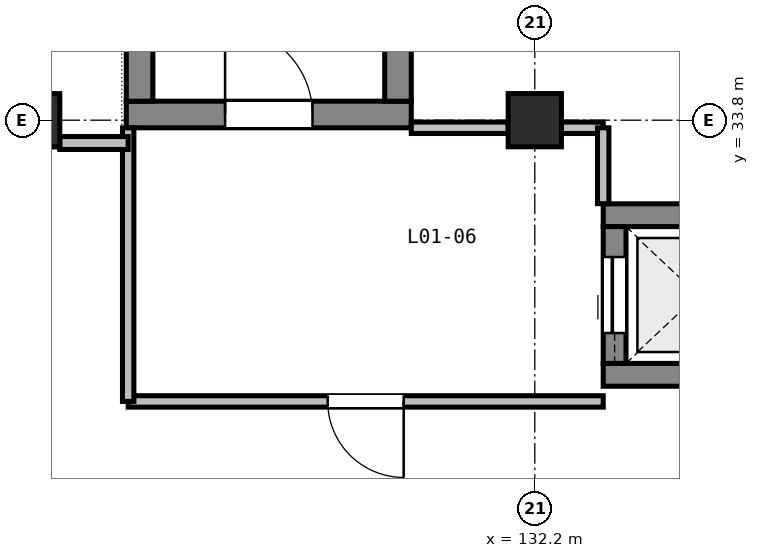
"""IFC4 building model, lengths in metres.
Left out: names, types, materials, properties, quantities, classifications, styles, units other than length and angle.
Written with IfcOpenShell. Run it as: python <this file> out.ifc"""

import sys

from ifc_helpers import new_model, si_unit, direction, frame, frame_2d, origin, origin_2d, place, context, subcontext, project, spatial, rectangle, extrude, element, fill, save


model = new_model("IFC4")
c1 = context("Model", 3, precision=1e-05, world=origin(), true_north=direction((0.0, 1.0)))
c2 = subcontext(c1, "Body", "Model", "MODEL_VIEW")
j1 = project(units=[si_unit("LENGTHUNIT", "METRE"), si_unit("PLANEANGLEUNIT", "RADIAN")], contexts=[c1])
p1 = place(None, origin())
s1 = spatial("IfcSite", under=j1, at=p1, CompositionType="ELEMENT")
p2 = place(p1, origin())
s2 = spatial("IfcBuilding", under=s1, at=p2, CompositionType="ELEMENT")
p3 = place(p2, frame((0.0, 0.0, 5.4)))
s3 = spatial("IfcBuildingStorey", under=s2, at=p3, CompositionType="ELEMENT", Elevation=5.4)
for number, where, z_axis, x_axis in (
    (1, (125.6, 33.8, 0.0), (0.0, 0.0, 1.0), (1.0, 0.0, 0.0)),
    (2, (132.2, 33.8, 0.0), (0.0, 0.0, 1.0), (1.0, 0.0, 0.0)),
):
    element("IfcColumn", number, at=place(p3, frame(where, z_axis=z_axis, x_axis=x_axis)), inside=s3, PredefinedType="COLUMN", context=c2, shape_type="SweptSolid", body=[
        extrude(rectangle(XDim=0.7, YDim=0.7, at=origin_2d()), origin(), (0.0, 0.0, 1.0), 4.8),
    ])
p4 = place(p3, frame((126.825, 33.875, 0.0), z_axis=(0.0, 0.0, 1.0), x_axis=(1.0, 0.0, 0.0)))
e3 = element("IfcWall", 3, at=p4, inside=s3, PredefinedType="SHEAR", context=c2, shape_type="SweptSolid", body=[
    extrude(rectangle(XDim=3.75, YDim=0.35, at=frame_2d((1.875, 0.0))), origin(), (0.0, 0.0, 1.0), 4.8),
])
p5 = place(p4, frame((1.3, 0.0, 0.0)))
e4 = element("IfcOpeningElement", 4, at=p5, cuts=e3, PredefinedType="OPENING", context=c2, shape_type="SweptSolid", body=[
    extrude(rectangle(XDim=1.15, YDim=2.15, at=frame_2d((0.575, 1.075))), frame((0.0, 0.185, 0.0), z_axis=(0.0, -1.0, 0.0), x_axis=(1.0, 0.0, 0.0)), (0.0, 0.0, 1.0), 0.37),
])
for number, where, z_axis, x_axis in (
    (5, (127.0, 34.05, 0.0), (0.0, 0.0, 1.0), (0.0, 1.0, 0.0)),
    (6, (130.4, 34.05, 0.0), (0.0, 0.0, 1.0), (0.0, 1.0, 0.0)),
):
    element("IfcWall", number, at=place(p3, frame(where, z_axis=z_axis, x_axis=x_axis)), inside=s3, PredefinedType="SHEAR", context=c2, shape_type="SweptSolid", body=[
        extrude(rectangle(XDim=7.275, YDim=0.35, at=frame_2d((3.637, 0.0))), origin(), (0.0, 0.0, 1.0), 4.8),
    ])
for number, where, z_axis, x_axis in (
    (7, (133.1, 30.45, 0.0), (0.0, 0.0, 1.0), (1.0, 0.0, 0.0)),
    (8, (133.1, 32.55, 0.0), (0.0, 0.0, 1.0), (1.0, 0.0, 0.0)),
):
    element("IfcWall", number, at=place(p3, frame(where, z_axis=z_axis, x_axis=x_axis)), inside=s3, PredefinedType="SHEAR", context=c2, shape_type="SweptSolid", body=[
        extrude(rectangle(XDim=2.5, YDim=0.3, at=frame_2d((1.25, 0.0))), origin(), (0.0, 0.0, 1.0), 4.8),
    ])
p6 = place(p3, frame((133.25, 30.6, 0.0), z_axis=(0.0, 0.0, 1.0), x_axis=(0.0, 1.0, 0.0)))
e9 = element("IfcWall", 9, at=p6, inside=s3, PredefinedType="SHEAR", context=c2, shape_type="SweptSolid", body=[
    extrude(rectangle(XDim=1.8, YDim=0.3, at=frame_2d((0.9, 0.0))), origin(), (0.0, 0.0, 1.0), 4.8),
])
p7 = place(p6, frame((0.4, 0.0, 0.0)))
e10 = element("IfcOpeningElement", 10, at=p7, cuts=e9, PredefinedType="OPENING", context=c2, shape_type="SweptSolid", body=[
    extrude(rectangle(XDim=1.0, YDim=2.1, at=frame_2d((0.5, 1.05))), frame((0.0, 0.16, 0.0), z_axis=(0.0, -1.0, 0.0), x_axis=(1.0, 0.0, 0.0)), (0.0, 0.0, 1.0), 0.32),
])
p8 = place(p3, frame((130.575, 33.7, 0.0), z_axis=(0.0, 0.0, 1.0), x_axis=(1.0, 0.0, 0.0)))
e11 = element("IfcWall", 11, at=p8, inside=s3, PredefinedType="PARTITIONING", context=c2, shape_type="SweptSolid", body=[
    extrude(rectangle(XDim=1.275, YDim=0.15, at=frame_2d((0.638, 0.0))), origin(), (0.0, 0.0, 1.0), 4.135),
])
p9 = place(p3, frame((132.55, 33.7, 0.0), z_axis=(0.0, 0.0, 1.0), x_axis=(1.0, 0.0, 0.0)))
e12 = element("IfcWall", 12, at=p9, inside=s3, PredefinedType="PARTITIONING", context=c2, shape_type="SweptSolid", body=[
    extrude(rectangle(XDim=0.55, YDim=0.15, at=frame_2d((0.275, 0.0))), origin(), (0.0, 0.0, 1.0), 4.135),
])
p10 = place(p3, frame((133.1, 33.7, 0.0), z_axis=(0.0, 0.0, 1.0), x_axis=(0.0, -1.0, 0.0)))
e13 = element("IfcWall", 13, at=p10, inside=s3, PredefinedType="PARTITIONING", context=c2, shape_type="SweptSolid", body=[
    extrude(rectangle(XDim=0.998, YDim=0.15, at=frame_2d((0.499, 0.0))), origin(), (0.0, 0.0, 1.0), 4.135),
])
p11 = place(p3, frame((133.1, 30.1, 0.0), z_axis=(0.0, 0.0, 1.0), x_axis=(-1.0, 0.0, 0.0)))
e14 = element("IfcWall", 14, at=p11, inside=s3, PredefinedType="PARTITIONING", context=c2, shape_type="SweptSolid", body=[
    extrude(rectangle(XDim=6.25, YDim=0.15, at=frame_2d((3.125, 0.0))), origin(), (0.0, 0.0, 1.0), 3.935),
])
p12 = place(p11, frame((2.625, 0.0, 0.0)))
e15 = element("IfcOpeningElement", 15, at=p12, cuts=e14, PredefinedType="OPENING", context=c2, shape_type="SweptSolid", body=[
    extrude(rectangle(XDim=1.0, YDim=2.1, at=frame_2d((0.5, 1.05))), frame((0.0, 0.085, 0.0), z_axis=(0.0, -1.0, 0.0), x_axis=(1.0, 0.0, 0.0)), (0.0, 0.0, 1.0), 0.17),
])
p13 = place(p3, frame((126.85, 30.1, 0.0), z_axis=(0.0, 0.0, 1.0), x_axis=(0.0, 1.0, 0.0)))
e16 = element("IfcWall", 16, at=p13, inside=s3, PredefinedType="PARTITIONING", context=c2, shape_type="SweptSolid", body=[
    extrude(rectangle(XDim=3.598, YDim=0.15, at=frame_2d((1.799, 0.0))), origin(), (0.0, 0.0, 1.0), 4.135),
])
p14 = place(p3, frame((126.85, 33.5, 0.0), z_axis=(0.0, 0.0, 1.0), x_axis=(-1.0, 0.0, 0.0)))
e17 = element("IfcWall", 17, at=p14, inside=s3, PredefinedType="PARTITIONING", context=c2, shape_type="SweptSolid", body=[
    extrude(rectangle(XDim=0.9, YDim=0.17, at=frame_2d((0.45, 0.0))), origin(), (0.0, 0.0, 1.0), 3.935),
])
p15 = place(p5, origin())
e18 = element("IfcDoor", 18, at=p15, inside=s3, OperationType="SINGLE_SWING_LEFT", PredefinedType="DOOR", context=c2, shape_type="SweptSolid", body=[
    extrude(rectangle(XDim=1.15, YDim=2.15, at=frame_2d((0.575, 1.075))), frame((0.0, 0.025, 0.0), z_axis=(0.0, -1.0, 0.0), x_axis=(1.0, 0.0, 0.0)), (0.0, 0.0, 1.0), 0.05),
])
fill(e4, e18)
p16 = place(p7, origin())
e19 = element("IfcDoor", 19, at=p16, inside=s3, OperationType="SLIDING_TO_LEFT", PredefinedType="DOOR", context=c2, shape_type="SweptSolid", body=[
    extrude(rectangle(XDim=1.0, YDim=2.1, at=frame_2d((0.5, 1.05))), frame((0.0, 0.025, 0.0), z_axis=(0.0, -1.0, 0.0), x_axis=(1.0, 0.0, 0.0)), (0.0, 0.0, 1.0), 0.05),
])
fill(e10, e19)
p17 = place(p12, origin())
e20 = element("IfcDoor", 20, at=p17, inside=s3, OperationType="SINGLE_SWING_LEFT", PredefinedType="DOOR", context=c2, shape_type="SweptSolid", body=[
    extrude(rectangle(XDim=1.0, YDim=2.1, at=frame_2d((0.5, 1.05))), frame((0.0, 0.025, 0.0), z_axis=(0.0, -1.0, 0.0), x_axis=(1.0, 0.0, 0.0)), (0.0, 0.0, 1.0), 0.05),
])
fill(e15, e20)
save(model, sys.argv[1])
